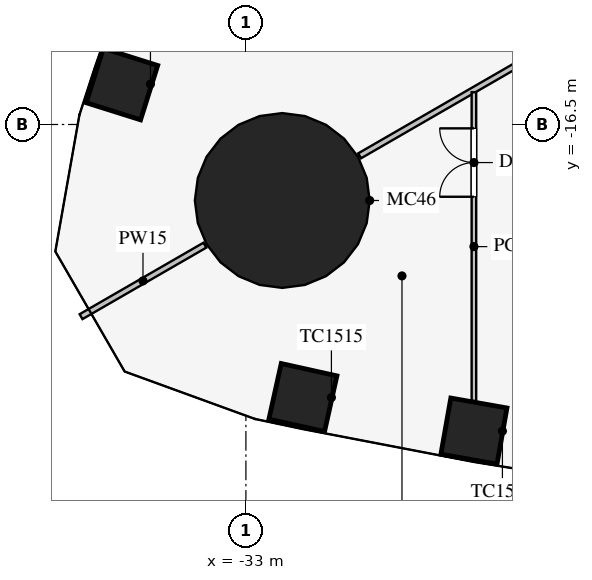
"""IFC4 building model, lengths in metres.
Left out: names, types, materials, properties, quantities, classifications, styles, units other than length and angle.
Written with IfcOpenShell. Run it as: python <this file> out.ifc"""

import sys

from ifc_helpers import new_model, si_unit, direction, frame, frame_2d, origin, origin_2d, place, context, subcontext, project, spatial, rectangle, circle, extrude, element, fill, save


model = new_model("IFC4")
c1 = context("Model", 3, precision=1e-05, world=origin(), true_north=direction((0.0, 1.0)))
c2 = subcontext(c1, "Body", "Model", "MODEL_VIEW")
j1 = project(units=[si_unit("LENGTHUNIT", "METRE"), si_unit("PLANEANGLEUNIT", "RADIAN")], contexts=[c1])
p1 = place(None, origin())
s1 = spatial("IfcSite", under=j1, at=p1, CompositionType="ELEMENT")
p2 = place(p1, origin())
s2 = spatial("IfcBuilding", under=s1, at=p2, CompositionType="ELEMENT")
p3 = place(p2, frame((0.0, 0.0, 16.5)))
s3 = spatial("IfcBuildingStorey", under=s2, at=p3, CompositionType="ELEMENT", Elevation=16.5)
for number, where, z_axis, x_axis in (
    (1, (-31.5, -23.685, 0.0), (0.0, 0.0, 1.0), (0.976, -0.217, 0.0)),
    (2, (-27.0, -24.568, 0.0), (0.0, 0.0, 1.0), (0.985, -0.174, 0.0)),
    (3, (-36.262, -15.438, 0.0), (0.0, 0.0, 1.0), (-0.3, -0.954, 0.0)),
):
    element("IfcColumn", number, at=place(p3, frame(where, z_axis=z_axis, x_axis=x_axis)), inside=s3, PredefinedType="COLUMN", context=c2, shape_type="SweptSolid", body=[
        extrude(rectangle(XDim=1.5, YDim=1.5, at=origin_2d()), origin(), (0.0, 0.0, 1.0), 4.2),
    ])
p4 = place(p3, frame((-32.043, -18.5, 0.0), z_axis=(0.0, 0.0, 1.0), x_axis=(1.0, 0.0, 0.0)))
e4 = element("IfcColumn", 4, at=p4, inside=s3, PredefinedType="COLUMN", context=c2, shape_type="SweptSolid", body=[
    extrude(circle(Radius=2.3, at=origin_2d()), origin(), (0.0, 0.0, 1.0), 4.2),
])
p5 = place(p3, frame((-14.203, -8.2, 0.0), z_axis=(0.0, 0.0, 1.0), x_axis=(-0.866024965723, -0.500000758745, 0.0)))
e5 = element("IfcWall", 5, at=p5, inside=s3, PredefinedType="PARTITIONING", context=c2, shape_type="SweptSolid", body=[
    extrude(rectangle(XDim=18.25, YDim=0.15, at=frame_2d((9.125, 0.0))), origin(), (0.0, 0.0, 1.0), 2.3),
])
p6 = place(p3, frame((-34.078, -19.675, 0.0), z_axis=(0.0, 0.0, 1.0), x_axis=(-0.866019247219, -0.500010663332, 0.0)))
e6 = element("IfcWall", 6, at=p6, inside=s3, PredefinedType="PARTITIONING", context=c2, shape_type="SweptSolid", body=[
    extrude(rectangle(XDim=3.764, YDim=0.15, at=frame_2d((1.882, 0.0))), origin(), (0.0, 0.0, 1.0), 2.3),
])
p7 = place(p3, frame((-27.0, -15.652, 0.0), z_axis=(0.0, 0.0, 1.0), x_axis=(0.0, -1.0, 0.0)))
e7 = element("IfcWall", 7, at=p7, inside=s3, PredefinedType="PARTITIONING", context=c2, shape_type="SweptSolid", body=[
    extrude(rectangle(XDim=8.124, YDim=0.12, at=frame_2d((4.062, 0.0))), origin(), (0.0, 0.0, 1.0), 2.9),
])
p8 = place(p7, frame((0.95, 0.0, 0.15)))
e8 = element("IfcOpeningElement", 8, at=p8, cuts=e7, PredefinedType="OPENING", context=c2, shape_type="SweptSolid", body=[
    extrude(rectangle(XDim=1.8, YDim=2.1, at=frame_2d((0.9, 1.05))), frame((0.0, 0.07, 0.0), z_axis=(0.0, -1.0, 0.0), x_axis=(1.0, 0.0, 0.0)), (0.0, 0.0, 1.0), 0.14),
])
p9 = place(p8, frame((1.8, 0.0, 0.0), z_axis=(0.0, 0.0, 1.0), x_axis=(-1.0, 0.0, 0.0)))
e9 = element("IfcDoor", 9, at=p9, inside=s3, OperationType="DOUBLE_DOOR_SINGLE_SWING", PredefinedType="DOOR", context=c2, shape_type="SweptSolid", body=[
    extrude(rectangle(XDim=1.8, YDim=2.1, at=frame_2d((0.9, 1.05))), frame((0.0, 0.025, 0.0), z_axis=(0.0, -1.0, 0.0), x_axis=(1.0, 0.0, 0.0)), (0.0, 0.0, 1.0), 0.05),
])
fill(e8, e9)
save(model, sys.argv[1])
